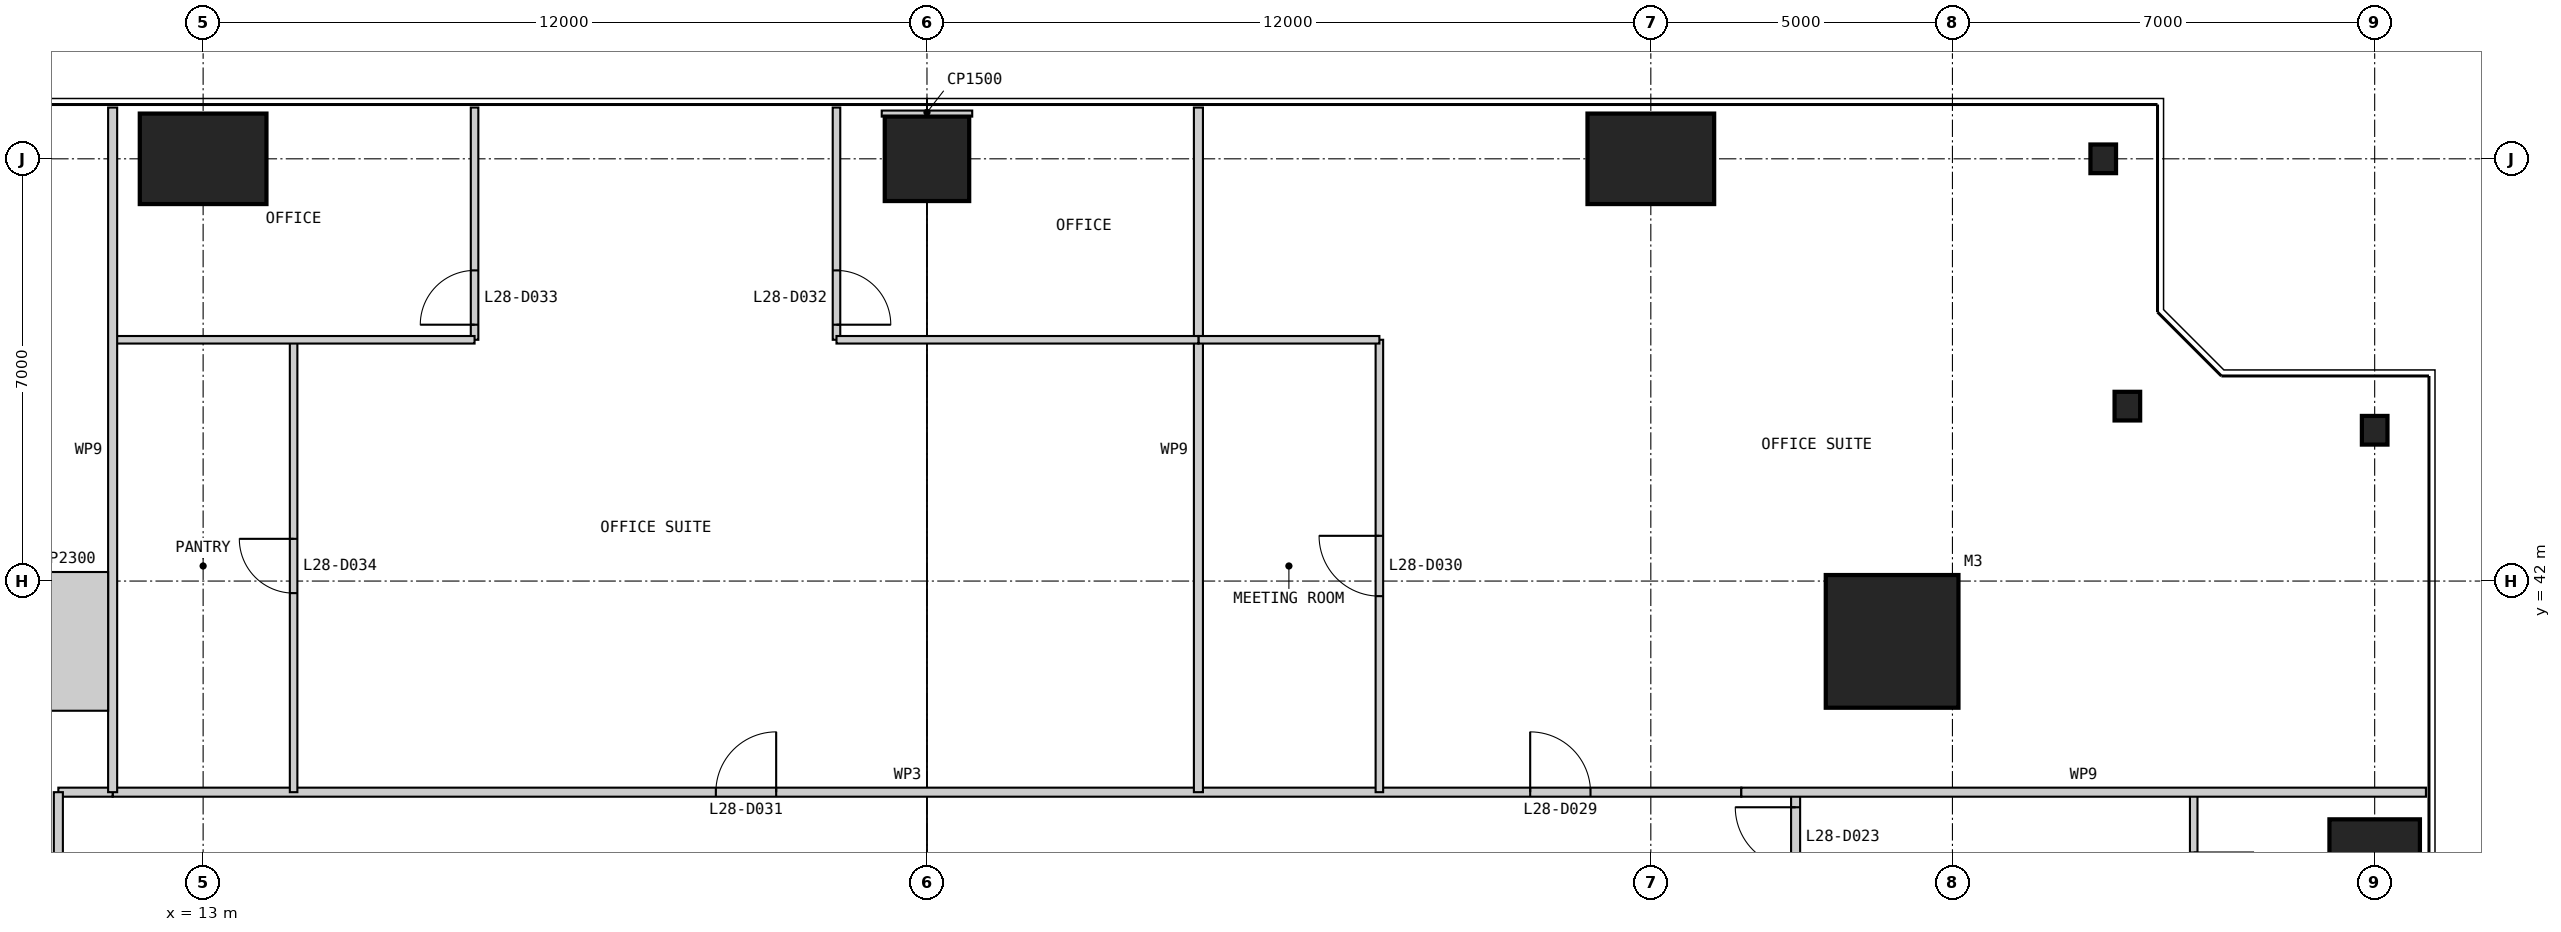
"""IFC4 building model, lengths in metres.
Left out: names, types, materials, properties, quantities, classifications, styles, units other than length and angle.
Written with IfcOpenShell. Run it as: python <this file> out.ifc"""

import sys

from ifc_helpers import new_model, si_unit, direction, frame, frame_2d, origin, origin_2d, place, context, subcontext, project, spatial, rectangle, i_section, extrude, element, fill, save


model = new_model("IFC4")
c1 = context("Model", 3, precision=1e-05, world=origin(), true_north=direction((0.0, 1.0)))
c2 = subcontext(c1, "Body", "Model", "MODEL_VIEW")
j1 = project(units=[si_unit("LENGTHUNIT", "METRE"), si_unit("PLANEANGLEUNIT", "RADIAN")], contexts=[c1])
p1 = place(None, origin())
s1 = spatial("IfcSite", under=j1, at=p1, CompositionType="ELEMENT")
p2 = place(p1, origin())
s2 = spatial("IfcBuilding", under=s1, at=p2, CompositionType="ELEMENT")
p3 = place(p2, frame((0.0, 0.0, 122.4)))
s3 = spatial("IfcBuildingStorey", under=s2, at=p3, CompositionType="ELEMENT", Elevation=122.4)
p4 = place(p3, frame((41.0, 41.0, 0.0), z_axis=(0.0, 0.0, 1.0), x_axis=(1.0, 0.0, 0.0)))
e1 = element("IfcColumn", 1, at=p4, inside=s3, PredefinedType="COLUMN", context=c2, shape_type="SweptSolid", body=[
    extrude(rectangle(XDim=2.2, YDim=2.2, at=origin_2d()), origin(), (0.0, 0.0, 1.0), 4.0),
])
p5 = place(p3, frame((49.0, 37.0, 0.0), z_axis=(0.0, 0.0, 1.0), x_axis=(1.0, 0.0, 0.0)))
e2 = element("IfcColumn", 2, at=p5, inside=s3, PredefinedType="COLUMN", context=c2, shape_type="SweptSolid", body=[
    extrude(rectangle(XDim=1.5, YDim=2.1, at=origin_2d()), origin(), (0.0, 0.0, 1.0), 4.0),
])
for number, where, z_axis, x_axis in (
    (3, (49.0, 44.5, 0.0), (0.0, 0.0, 1.0), (1.0, 0.0, 0.0)),
    (4, (44.9, 44.9, 0.0), (0.0, 0.0, 1.0), (1.0, 0.0, 0.0)),
    (5, (44.5, 49.0, 0.0), (0.0, 0.0, 1.0), (1.0, 0.0, 0.0)),
):
    element("IfcColumn", number, at=place(p3, frame(where, z_axis=z_axis, x_axis=x_axis)), inside=s3, PredefinedType="COLUMN", context=c2, shape_type="SweptSolid", body=[
        extrude(i_section(OverallWidth=0.424, OverallDepth=0.475, WebThickness=0.048, FlangeThickness=0.077, at=origin_2d()), origin(), (0.0, 0.0, 1.0), 4.0),
    ])
p6 = place(p3, frame((37.0, 49.0, 0.0), z_axis=(0.0, 0.0, 1.0), x_axis=(1.0, 0.0, 0.0)))
e6 = element("IfcColumn", 6, at=p6, inside=s3, PredefinedType="COLUMN", context=c2, shape_type="SweptSolid", body=[
    extrude(rectangle(XDim=2.1, YDim=1.5, at=origin_2d()), origin(), (0.0, 0.0, 1.0), 4.0),
])
p7 = place(p3, frame((25.0, 49.0, 0.0), z_axis=(0.0, 0.0, 1.0), x_axis=(1.0, 0.0, 0.0)))
e7 = element("IfcColumn", 7, at=p7, inside=s3, PredefinedType="COLUMN", context=c2, shape_type="SweptSolid", body=[
    extrude(rectangle(XDim=1.4, YDim=1.4, at=origin_2d()), origin(), (0.0, 0.0, 1.0), 4.0),
])
p8 = place(p3, frame((13.0, 49.0, 0.0), z_axis=(0.0, 0.0, 1.0), x_axis=(1.0, 0.0, 0.0)))
e8 = element("IfcColumn", 8, at=p8, inside=s3, PredefinedType="COLUMN", context=c2, shape_type="SweptSolid", body=[
    extrude(rectangle(XDim=2.1, YDim=1.5, at=origin_2d()), origin(), (0.0, 0.0, 1.0), 4.0),
])
p9 = place(p3, frame((39.4, 11.5, 0.0), z_axis=(0.0, 0.0, 1.0), x_axis=(0.0, 1.0, 0.0)))
e9 = element("IfcWall", 9, at=p9, inside=s3, PredefinedType="PARTITIONING", context=c2, shape_type="SweptSolid", body=[
    extrude(rectangle(XDim=27.0, YDim=0.15, at=frame_2d((13.5, 0.0))), origin(), (0.0, 0.0, 1.0), 3.85),
])
p10 = place(p9, frame((3.25, 0.0, 0.0)))
e10 = element("IfcOpeningElement", 10, at=p10, cuts=e9, PredefinedType="OPENING", context=c2, shape_type="SweptSolid", body=[
    extrude(rectangle(XDim=1.0, YDim=2.2, at=frame_2d((0.5, 1.1))), frame((0.0, 0.085, 0.0), z_axis=(0.0, -1.0, 0.0), x_axis=(1.0, 0.0, 0.0)), (0.0, 0.0, 1.0), 0.17),
])
p11 = place(p9, frame((25.75, 0.0, 0.0)))
e11 = element("IfcOpeningElement", 11, at=p11, cuts=e9, PredefinedType="OPENING", context=c2, shape_type="SweptSolid", body=[
    extrude(rectangle(XDim=1.0, YDim=2.2, at=frame_2d((0.5, 1.1))), frame((0.0, 0.085, 0.0), z_axis=(0.0, -1.0, 0.0), x_axis=(1.0, 0.0, 0.0)), (0.0, 0.0, 1.0), 0.17),
])
p12 = place(p9, frame((1.75, 0.0, 0.0)))
e12 = element("IfcOpeningElement", 12, at=p12, cuts=e9, PredefinedType="OPENING", context=c2, shape_type="SweptSolid", body=[
    extrude(rectangle(XDim=1.0, YDim=2.2, at=frame_2d((0.5, 1.1))), frame((0.0, 0.085, 0.0), z_axis=(0.0, -1.0, 0.0), x_axis=(1.0, 0.0, 0.0)), (0.0, 0.0, 1.0), 0.17),
])
p13 = place(p3, frame((46.0, 14.5, 0.0), z_axis=(0.0, 0.0, 1.0), x_axis=(0.0, 1.0, 0.0)))
e13 = element("IfcWall", 13, at=p13, inside=s3, PredefinedType="PARTITIONING", context=c2, shape_type="SweptSolid", body=[
    extrude(rectangle(XDim=24.0, YDim=0.125, at=frame_2d((12.0, 0.0))), origin(), (0.0, 0.0, 1.0), 3.238),
])
p14 = place(p13, frame((4.75, 0.0, 0.0)))
e14 = element("IfcOpeningElement", 14, at=p14, cuts=e13, PredefinedType="OPENING", context=c2, shape_type="SweptSolid", body=[
    extrude(rectangle(XDim=1.0, YDim=2.2, at=frame_2d((0.5, 1.1))), frame((0.0, 0.073, 0.0), z_axis=(0.0, -1.0, 0.0), x_axis=(1.0, 0.0, 0.0)), (0.0, 0.0, 1.0), 0.145),
])
p15 = place(p13, frame((10.0, 0.0, 0.0)))
e15 = element("IfcOpeningElement", 15, at=p15, cuts=e13, PredefinedType="OPENING", context=c2, shape_type="SweptSolid", body=[
    extrude(rectangle(XDim=1.0, YDim=2.2, at=frame_2d((0.5, 1.1))), frame((0.0, 0.073, 0.0), z_axis=(0.0, -1.0, 0.0), x_axis=(1.0, 0.0, 0.0)), (0.0, 0.0, 1.0), 0.145),
])
p16 = place(p13, frame((16.0, 0.0, 0.0)))
e16 = element("IfcOpeningElement", 16, at=p16, cuts=e13, PredefinedType="OPENING", context=c2, shape_type="SweptSolid", body=[
    extrude(rectangle(XDim=1.0, YDim=2.2, at=frame_2d((0.5, 1.1))), frame((0.0, 0.073, 0.0), z_axis=(0.0, -1.0, 0.0), x_axis=(1.0, 0.0, 0.0)), (0.0, 0.0, 1.0), 0.145),
])
p17 = place(p13, frame((22.0, 0.0, 0.0)))
e17 = element("IfcOpeningElement", 17, at=p17, cuts=e13, PredefinedType="OPENING", context=c2, shape_type="SweptSolid", body=[
    extrude(rectangle(XDim=1.0, YDim=2.2, at=frame_2d((0.5, 1.1))), frame((0.0, 0.073, 0.0), z_axis=(0.0, -1.0, 0.0), x_axis=(1.0, 0.0, 0.0)), (0.0, 0.0, 1.0), 0.145),
])
p18 = place(p3, frame((38.5, 38.5, 0.0), z_axis=(0.0, 0.0, 1.0), x_axis=(-1.0, 0.0, 0.0)))
e18 = element("IfcWall", 18, at=p18, inside=s3, PredefinedType="PARTITIONING", context=c2, shape_type="SweptSolid", body=[
    extrude(rectangle(XDim=27.0, YDim=0.15, at=frame_2d((13.5, 0.0))), origin(), (0.0, 0.0, 1.0), 3.85),
])
p19 = place(p18, frame((2.5, 0.0, 0.0)))
e19 = element("IfcOpeningElement", 19, at=p19, cuts=e18, PredefinedType="OPENING", context=c2, shape_type="SweptSolid", body=[
    extrude(rectangle(XDim=1.0, YDim=2.2, at=frame_2d((0.5, 1.1))), frame((0.0, 0.085, 0.0), z_axis=(0.0, -1.0, 0.0), x_axis=(1.0, 0.0, 0.0)), (0.0, 0.0, 1.0), 0.17),
])
p20 = place(p18, frame((16.0, 0.0, 0.0)))
e20 = element("IfcOpeningElement", 20, at=p20, cuts=e18, PredefinedType="OPENING", context=c2, shape_type="SweptSolid", body=[
    extrude(rectangle(XDim=1.0, YDim=2.2, at=frame_2d((0.5, 1.1))), frame((0.0, 0.085, 0.0), z_axis=(0.0, -1.0, 0.0), x_axis=(1.0, 0.0, 0.0)), (0.0, 0.0, 1.0), 0.17),
])
p21 = place(p3, frame((49.85, 38.5, 0.0), z_axis=(0.0, 0.0, 1.0), x_axis=(-1.0, 0.0, 0.0)))
e21 = element("IfcWall", 21, at=p21, inside=s3, PredefinedType="PARTITIONING", context=c2, shape_type="SweptSolid", body=[
    extrude(rectangle(XDim=11.35, YDim=0.15, at=frame_2d((5.675, 0.0))), origin(), (0.0, 0.0, 1.0), 3.85),
])
p22 = place(p3, frame((32.5, 46.0, 0.0), z_axis=(0.0, 0.0, 1.0), x_axis=(0.0, -1.0, 0.0)))
e22 = element("IfcWall", 22, at=p22, inside=s3, PredefinedType="PARTITIONING", context=c2, shape_type="SweptSolid", body=[
    extrude(rectangle(XDim=7.5, YDim=0.125, at=frame_2d((3.75, 0.0))), origin(), (0.0, 0.0, 1.0), 3.85),
])
p23 = place(p22, frame((3.25, 0.0, 0.0)))
e23 = element("IfcOpeningElement", 23, at=p23, cuts=e22, PredefinedType="OPENING", context=c2, shape_type="SweptSolid", body=[
    extrude(rectangle(XDim=1.0, YDim=2.2, at=frame_2d((0.5, 1.1))), frame((0.0, 0.073, 0.0), z_axis=(0.0, -1.0, 0.0), x_axis=(1.0, 0.0, 0.0)), (0.0, 0.0, 1.0), 0.145),
])
p24 = place(p3, frame((29.5, 49.85, 0.0), z_axis=(0.0, 0.0, 1.0), x_axis=(0.0, -1.0, 0.0)))
e24 = element("IfcWall", 24, at=p24, inside=s3, PredefinedType="PARTITIONING", context=c2, shape_type="SweptSolid", body=[
    extrude(rectangle(XDim=11.35, YDim=0.15, at=frame_2d((5.675, 0.0))), origin(), (0.0, 0.0, 1.0), 3.85),
])
p25 = place(p3, frame((23.5, 49.85, 0.0), z_axis=(0.0, 0.0, 1.0), x_axis=(0.0, -1.0, 0.0)))
e25 = element("IfcWall", 25, at=p25, inside=s3, PredefinedType="PARTITIONING", context=c2, shape_type="SweptSolid", body=[
    extrude(rectangle(XDim=3.85, YDim=0.125, at=frame_2d((1.925, 0.0))), origin(), (0.0, 0.0, 1.0), 3.85),
])
p26 = place(p25, frame((2.7, 0.0, 0.0)))
e26 = element("IfcOpeningElement", 26, at=p26, cuts=e25, PredefinedType="OPENING", context=c2, shape_type="SweptSolid", body=[
    extrude(rectangle(XDim=0.9, YDim=2.2, at=frame_2d((0.45, 1.1))), frame((0.0, 0.073, 0.0), z_axis=(0.0, -1.0, 0.0), x_axis=(1.0, 0.0, 0.0)), (0.0, 0.0, 1.0), 0.145),
])
p27 = place(p3, frame((17.5, 49.85, 0.0), z_axis=(0.0, 0.0, 1.0), x_axis=(0.0, -1.0, 0.0)))
e27 = element("IfcWall", 27, at=p27, inside=s3, PredefinedType="PARTITIONING", context=c2, shape_type="SweptSolid", body=[
    extrude(rectangle(XDim=3.85, YDim=0.125, at=frame_2d((1.925, 0.0))), origin(), (0.0, 0.0, 1.0), 3.85),
])
p28 = place(p27, frame((2.7, 0.0, 0.0)))
e28 = element("IfcOpeningElement", 28, at=p28, cuts=e27, PredefinedType="OPENING", context=c2, shape_type="SweptSolid", body=[
    extrude(rectangle(XDim=0.9, YDim=2.2, at=frame_2d((0.45, 1.1))), frame((0.0, 0.073, 0.0), z_axis=(0.0, -1.0, 0.0), x_axis=(1.0, 0.0, 0.0)), (0.0, 0.0, 1.0), 0.145),
])
p29 = place(p3, frame((14.5, 46.0, 0.0), z_axis=(0.0, 0.0, 1.0), x_axis=(0.0, -1.0, 0.0)))
e29 = element("IfcWall", 29, at=p29, inside=s3, PredefinedType="PARTITIONING", context=c2, shape_type="SweptSolid", body=[
    extrude(rectangle(XDim=7.5, YDim=0.125, at=frame_2d((3.75, 0.0))), origin(), (0.0, 0.0, 1.0), 3.85),
])
p30 = place(p29, frame((3.3, 0.0, 0.0)))
e30 = element("IfcOpeningElement", 30, at=p30, cuts=e29, PredefinedType="OPENING", context=c2, shape_type="SweptSolid", body=[
    extrude(rectangle(XDim=0.9, YDim=2.2, at=frame_2d((0.45, 1.1))), frame((0.0, 0.073, 0.0), z_axis=(0.0, -1.0, 0.0), x_axis=(1.0, 0.0, 0.0)), (0.0, 0.0, 1.0), 0.145),
])
p31 = place(p3, frame((32.5, 46.0, 0.0), z_axis=(0.0, 0.0, 1.0), x_axis=(-1.0, 0.0, 0.0)))
e31 = element("IfcWall", 31, at=p31, inside=s3, PredefinedType="PARTITIONING", context=c2, shape_type="SweptSolid", body=[
    extrude(rectangle(XDim=3.0, YDim=0.125, at=frame_2d((1.5, 0.0))), origin(), (0.0, 0.0, 1.0), 3.85),
])
for number, where, z_axis, x_axis in (
    (32, (29.5, 46.0, 0.0), (0.0, 0.0, 1.0), (-1.0, 0.0, 0.0)),
    (33, (17.5, 46.0, 0.0), (0.0, 0.0, 1.0), (-1.0, 0.0, 0.0)),
):
    element("IfcWall", number, at=place(p3, frame(where, z_axis=z_axis, x_axis=x_axis)), inside=s3, PredefinedType="PARTITIONING", context=c2, shape_type="SweptSolid", body=[
        extrude(rectangle(XDim=6.0, YDim=0.125, at=frame_2d((3.0, 0.0))), origin(), (0.0, 0.0, 1.0), 3.85),
    ])
p32 = place(p3, frame((11.5, 38.5, 0.0), z_axis=(0.0, 0.0, 1.0), x_axis=(-1.0, 0.0, 0.0)))
e34 = element("IfcWall", 34, at=p32, inside=s3, PredefinedType="PARTITIONING", context=c2, shape_type="SweptSolid", body=[
    extrude(rectangle(XDim=0.9, YDim=0.15, at=frame_2d((0.45, 0.0))), origin(), (0.0, 0.0, 1.0), 3.85),
])
p33 = place(p3, frame((10.6, 38.5, 0.0), z_axis=(0.0, 0.0, 1.0), x_axis=(0.0, -1.0, 0.0)))
e35 = element("IfcWall", 35, at=p33, inside=s3, PredefinedType="PARTITIONING", context=c2, shape_type="SweptSolid", body=[
    extrude(rectangle(XDim=27.0, YDim=0.15, at=frame_2d((13.5, 0.0))), origin(), (0.0, 0.0, 1.0), 3.85),
])
p34 = place(p33, frame((3.25, 0.0, 0.0)))
e36 = element("IfcOpeningElement", 36, at=p34, cuts=e35, PredefinedType="OPENING", context=c2, shape_type="SweptSolid", body=[
    extrude(rectangle(XDim=1.0, YDim=2.2, at=frame_2d((0.5, 1.1))), frame((0.0, 0.085, 0.0), z_axis=(0.0, -1.0, 0.0), x_axis=(1.0, 0.0, 0.0)), (0.0, 0.0, 1.0), 0.17),
])
p35 = place(p33, frame((22.75, 0.0, 0.0)))
e37 = element("IfcOpeningElement", 37, at=p35, cuts=e35, PredefinedType="OPENING", context=c2, shape_type="SweptSolid", body=[
    extrude(rectangle(XDim=1.0, YDim=2.2, at=frame_2d((0.5, 1.1))), frame((0.0, 0.085, 0.0), z_axis=(0.0, -1.0, 0.0), x_axis=(1.0, 0.0, 0.0)), (0.0, 0.0, 1.0), 0.17),
])
p36 = place(p3, frame((11.5, 49.85, 0.0), z_axis=(0.0, 0.0, 1.0), x_axis=(0.0, -1.0, 0.0)))
e38 = element("IfcWall", 38, at=p36, inside=s3, PredefinedType="PARTITIONING", context=c2, shape_type="SweptSolid", body=[
    extrude(rectangle(XDim=11.35, YDim=0.15, at=frame_2d((5.675, 0.0))), origin(), (0.0, 0.0, 1.0), 3.85),
])
p37 = place(p3, frame((25.0, 49.8, 0.0), z_axis=(0.0, 0.0, 1.0), x_axis=(0.0, -1.0, 0.0)))
e39 = element("IfcWall", 39, at=p37, inside=s3, PredefinedType="PARTITIONING", context=c2, shape_type="SweptSolid", body=[
    extrude(rectangle(XDim=0.1, YDim=1.5, at=frame_2d((0.05, 0.0))), origin(), (0.0, 0.0, 1.0), 3.85),
])
p38 = place(p3, frame((11.425, 41.0, 0.0), z_axis=(0.0, 0.0, 1.0), x_axis=(-1.0, 0.0, 0.0)))
e40 = element("IfcWall", 40, at=p38, inside=s3, PredefinedType="PARTITIONING", context=c2, shape_type="SweptSolid", body=[
    extrude(rectangle(XDim=1.325, YDim=2.3, at=frame_2d((0.663, 0.0))), origin(), (0.0, 0.0, 1.0), 3.85),
])
p39 = place(p11, origin())
e41 = element("IfcDoor", 41, at=p39, inside=s3, OperationType="SINGLE_SWING_RIGHT", PredefinedType="DOOR", context=c2, shape_type="SweptSolid", body=[
    extrude(rectangle(XDim=1.0, YDim=2.2, at=frame_2d((0.5, 1.1))), frame((0.0, 0.025, 0.0), z_axis=(0.0, -1.0, 0.0), x_axis=(1.0, 0.0, 0.0)), (0.0, 0.0, 1.0), 0.05),
])
fill(e11, e41)
p40 = place(p19, frame((1.0, 0.0, 0.0), z_axis=(0.0, 0.0, 1.0), x_axis=(-1.0, 0.0, 0.0)))
e42 = element("IfcDoor", 42, at=p40, inside=s3, OperationType="SINGLE_SWING_LEFT", PredefinedType="DOOR", context=c2, shape_type="SweptSolid", body=[
    extrude(rectangle(XDim=1.0, YDim=2.2, at=frame_2d((0.5, 1.1))), frame((0.0, 0.025, 0.0), z_axis=(0.0, -1.0, 0.0), x_axis=(1.0, 0.0, 0.0)), (0.0, 0.0, 1.0), 0.05),
])
fill(e19, e42)
p41 = place(p23, frame((1.0, 0.0, 0.0), z_axis=(0.0, 0.0, 1.0), x_axis=(-1.0, 0.0, 0.0)))
e43 = element("IfcDoor", 43, at=p41, inside=s3, OperationType="SINGLE_SWING_RIGHT", PredefinedType="DOOR", context=c2, shape_type="SweptSolid", body=[
    extrude(rectangle(XDim=1.0, YDim=2.2, at=frame_2d((0.5, 1.1))), frame((0.0, 0.025, 0.0), z_axis=(0.0, -1.0, 0.0), x_axis=(1.0, 0.0, 0.0)), (0.0, 0.0, 1.0), 0.05),
])
fill(e23, e43)
p42 = place(p20, frame((1.0, 0.0, 0.0), z_axis=(0.0, 0.0, 1.0), x_axis=(-1.0, 0.0, 0.0)))
e44 = element("IfcDoor", 44, at=p42, inside=s3, OperationType="SINGLE_SWING_RIGHT", PredefinedType="DOOR", context=c2, shape_type="SweptSolid", body=[
    extrude(rectangle(XDim=1.0, YDim=2.2, at=frame_2d((0.5, 1.1))), frame((0.0, 0.025, 0.0), z_axis=(0.0, -1.0, 0.0), x_axis=(1.0, 0.0, 0.0)), (0.0, 0.0, 1.0), 0.05),
])
fill(e20, e44)
p43 = place(p26, origin())
e45 = element("IfcDoor", 45, at=p43, inside=s3, OperationType="SINGLE_SWING_RIGHT", PredefinedType="DOOR", context=c2, shape_type="SweptSolid", body=[
    extrude(rectangle(XDim=0.9, YDim=2.2, at=frame_2d((0.45, 1.1))), frame((0.0, 0.025, 0.0), z_axis=(0.0, -1.0, 0.0), x_axis=(1.0, 0.0, 0.0)), (0.0, 0.0, 1.0), 0.05),
])
fill(e26, e45)
p44 = place(p28, frame((0.9, 0.0, 0.0), z_axis=(0.0, 0.0, 1.0), x_axis=(-1.0, 0.0, 0.0)))
e46 = element("IfcDoor", 46, at=p44, inside=s3, OperationType="SINGLE_SWING_LEFT", PredefinedType="DOOR", context=c2, shape_type="SweptSolid", body=[
    extrude(rectangle(XDim=0.9, YDim=2.2, at=frame_2d((0.45, 1.1))), frame((0.0, 0.025, 0.0), z_axis=(0.0, -1.0, 0.0), x_axis=(1.0, 0.0, 0.0)), (0.0, 0.0, 1.0), 0.05),
])
fill(e28, e46)
p45 = place(p30, frame((0.9, 0.0, 0.0), z_axis=(0.0, 0.0, 1.0), x_axis=(-1.0, 0.0, 0.0)))
e47 = element("IfcDoor", 47, at=p45, inside=s3, OperationType="SINGLE_SWING_RIGHT", PredefinedType="DOOR", context=c2, shape_type="SweptSolid", body=[
    extrude(rectangle(XDim=0.9, YDim=2.2, at=frame_2d((0.45, 1.1))), frame((0.0, 0.025, 0.0), z_axis=(0.0, -1.0, 0.0), x_axis=(1.0, 0.0, 0.0)), (0.0, 0.0, 1.0), 0.05),
])
fill(e30, e47)
save(model, sys.argv[1])
